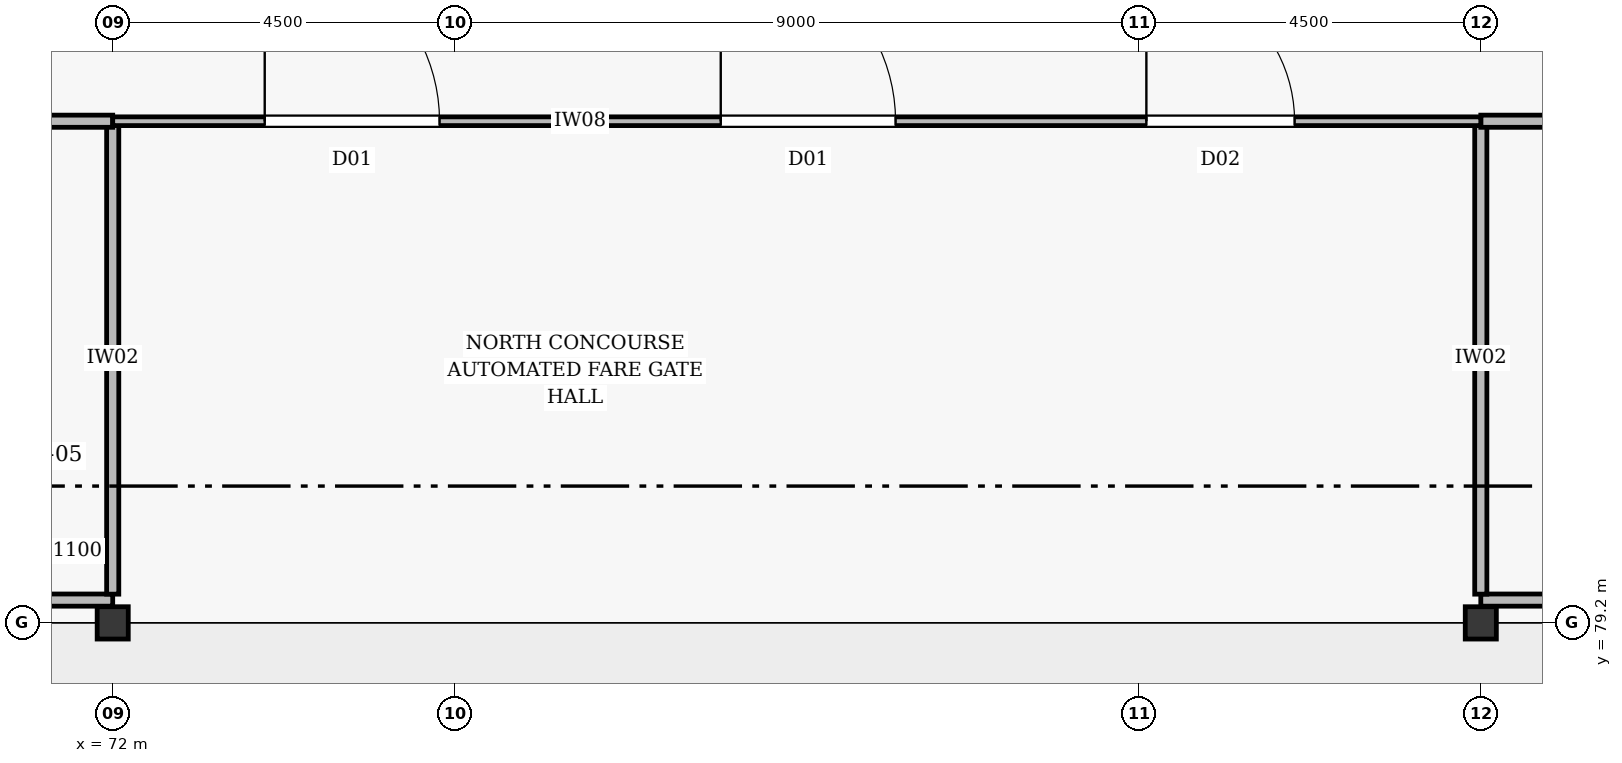
"""IFC4 building model, lengths in metres.
Left out: names, types, materials, properties, quantities, classifications, styles, units other than length and angle.
Written with IfcOpenShell. Run it as: python <this file> out.ifc"""

import sys

from ifc_helpers import new_model, si_unit, direction, frame, frame_2d, origin, origin_2d, place, context, subcontext, project, spatial, rectangle, i_section, extrude, element, fill, save


model = new_model("IFC4")
c1 = context("Model", 3, precision=1e-05, world=origin(), true_north=direction((0.0, 1.0)))
c2 = subcontext(c1, "Body", "Model", "MODEL_VIEW")
j1 = project(units=[si_unit("LENGTHUNIT", "METRE"), si_unit("PLANEANGLEUNIT", "RADIAN")], contexts=[c1])
p1 = place(None, origin())
s1 = spatial("IfcSite", under=j1, at=p1, CompositionType="ELEMENT")
p2 = place(p1, origin())
s2 = spatial("IfcBuilding", under=s1, at=p2, CompositionType="ELEMENT")
p3 = place(p2, origin())
s3 = spatial("IfcBuildingStorey", under=s2, at=p3, CompositionType="ELEMENT", Elevation=0.0)
for number, where, z_axis, x_axis in (
    (1, (72.0, 79.2, 0.0), (0.0, 0.0, 1.0), (1.0, 0.0, 0.0)),
    (2, (90.0, 79.2, 0.0), (0.0, 0.0, 1.0), (1.0, 0.0, 0.0)),
):
    element("IfcColumn", number, at=place(p3, frame(where, z_axis=z_axis, x_axis=x_axis)), inside=s3, PredefinedType="COLUMN", context=c2, shape_type="SweptSolid", body=[
        extrude(i_section(OverallWidth=0.409, OverallDepth=0.425, WebThickness=0.025, FlangeThickness=0.039, at=origin_2d()), origin(), (0.0, 0.0, 1.0), 6.6),
    ])
for number, where, z_axis, x_axis in (
    (3, (54.228, 79.5, 0.0), (0.0, 0.0, 1.0), (1.0, 0.0, 0.0)),
    (4, (90.0, 79.5, 0.0), (0.0, 0.0, 1.0), (1.0, 0.0, 0.0)),
):
    element("IfcWall", number, at=place(p3, frame(where, z_axis=z_axis, x_axis=x_axis)), inside=s3, PredefinedType="PARTITIONING", context=c2, shape_type="SweptSolid", body=[
        extrude(rectangle(XDim=17.772, YDim=0.16, at=frame_2d((8.886, 0.0))), origin(), (0.0, 0.0, 1.0), 4.68),
    ])
for number, where, z_axis, x_axis in (
    (5, (72.0, 79.578, 0.0), (0.0, 0.0, 1.0), (0.0, 1.0, 0.0)),
    (6, (90.0, 79.578, 0.0), (0.0, 0.0, 1.0), (0.0, 1.0, 0.0)),
):
    element("IfcWall", number, at=place(p3, frame(where, z_axis=z_axis, x_axis=x_axis)), inside=s3, PredefinedType="PARTITIONING", context=c2, shape_type="SweptSolid", body=[
        extrude(rectangle(XDim=6.222, YDim=0.16, at=frame_2d((3.111, 0.0))), origin(), (0.0, 0.0, 1.0), 4.68),
    ])
p4 = place(p3, frame((54.15, 85.8, 0.0), z_axis=(0.0, 0.0, 1.0), x_axis=(1.0, 0.0, 0.0)))
e7 = element("IfcWall", 7, at=p4, inside=s3, PredefinedType="PARTITIONING", context=c2, shape_type="SweptSolid", body=[
    extrude(rectangle(XDim=17.85, YDim=0.16, at=frame_2d((8.925, 0.0))), origin(), (0.0, 0.0, 1.0), 5.84),
])
p5 = place(p4, frame((3.4, 0.0, 0.005)))
e8 = element("IfcOpeningElement", 8, at=p5, cuts=e7, PredefinedType="OPENING", context=c2, shape_type="SweptSolid", body=[
    extrude(rectangle(XDim=1.45, YDim=2.15, at=frame_2d((0.725, 1.075))), frame((0.0, 0.092, 0.0), z_axis=(0.0, -1.0, 0.0), x_axis=(1.0, 0.0, 0.0)), (0.0, 0.0, 1.0), 0.184),
])
p6 = place(p4, frame((10.15, 0.0, 0.005)))
e9 = element("IfcOpeningElement", 9, at=p6, cuts=e7, PredefinedType="OPENING", context=c2, shape_type="SweptSolid", body=[
    extrude(rectangle(XDim=1.1, YDim=2.1, at=frame_2d((0.55, 1.05))), frame((0.0, 0.092, 0.0), z_axis=(0.0, -1.0, 0.0), x_axis=(1.0, 0.0, 0.0)), (0.0, 0.0, 1.0), 0.184),
])
p7 = place(p3, frame((90.0, 85.8, 0.0), z_axis=(0.0, 0.0, 1.0), x_axis=(1.0, 0.0, 0.0)))
e10 = element("IfcWall", 10, at=p7, inside=s3, PredefinedType="PARTITIONING", context=c2, shape_type="SweptSolid", body=[
    extrude(rectangle(XDim=17.85, YDim=0.16, at=frame_2d((8.925, 0.0))), origin(), (0.0, 0.0, 1.0), 5.84),
])
p8 = place(p7, frame((4.3, 0.0, 0.005)))
e11 = element("IfcOpeningElement", 11, at=p8, cuts=e10, PredefinedType="OPENING", context=c2, shape_type="SweptSolid", body=[
    extrude(rectangle(XDim=1.1, YDim=2.1, at=frame_2d((0.55, 1.05))), frame((0.0, 0.092, 0.0), z_axis=(0.0, -1.0, 0.0), x_axis=(1.0, 0.0, 0.0)), (0.0, 0.0, 1.0), 0.184),
])
p9 = place(p7, frame((12.6, 0.0, 0.005)))
e12 = element("IfcOpeningElement", 12, at=p9, cuts=e10, PredefinedType="OPENING", context=c2, shape_type="SweptSolid", body=[
    extrude(rectangle(XDim=1.45, YDim=2.15, at=frame_2d((0.725, 1.075))), frame((0.0, 0.092, 0.0), z_axis=(0.0, -1.0, 0.0), x_axis=(1.0, 0.0, 0.0)), (0.0, 0.0, 1.0), 0.184),
])
p10 = place(p3, frame((72.0, 85.8, 0.0), z_axis=(0.0, 0.0, 1.0), x_axis=(1.0, 0.0, 0.0)))
e13 = element("IfcWall", 13, at=p10, inside=s3, PredefinedType="PARTITIONING", context=c2, shape_type="SweptSolid", body=[
    extrude(rectangle(XDim=18.0, YDim=0.115, at=frame_2d((9.0, 0.0))), origin(), (0.0, 0.0, 1.0), 5.84),
])
p11 = place(p10, frame((2.0, 0.0, 0.005)))
e14 = element("IfcOpeningElement", 14, at=p11, cuts=e13, PredefinedType="OPENING", context=c2, shape_type="SweptSolid", body=[
    extrude(rectangle(XDim=2.3, YDim=2.4, at=frame_2d((1.15, 1.2))), frame((0.0, 0.069, 0.0), z_axis=(0.0, -1.0, 0.0), x_axis=(1.0, 0.0, 0.0)), (0.0, 0.0, 1.0), 0.139),
])
p12 = place(p10, frame((8.0, 0.0, 0.005)))
e15 = element("IfcOpeningElement", 15, at=p12, cuts=e13, PredefinedType="OPENING", context=c2, shape_type="SweptSolid", body=[
    extrude(rectangle(XDim=2.3, YDim=2.4, at=frame_2d((1.15, 1.2))), frame((0.0, 0.069, 0.0), z_axis=(0.0, -1.0, 0.0), x_axis=(1.0, 0.0, 0.0)), (0.0, 0.0, 1.0), 0.139),
])
p13 = place(p10, frame((13.6, 0.0, 0.005)))
e16 = element("IfcOpeningElement", 16, at=p13, cuts=e13, PredefinedType="OPENING", context=c2, shape_type="SweptSolid", body=[
    extrude(rectangle(XDim=1.95, YDim=2.3, at=frame_2d((0.975, 1.15))), frame((0.0, 0.069, 0.0), z_axis=(0.0, -1.0, 0.0), x_axis=(1.0, 0.0, 0.0)), (0.0, 0.0, 1.0), 0.139),
])
p14 = place(p11, origin())
e17 = element("IfcDoor", 17, at=p14, inside=s3, OperationType="DOUBLE_DOOR_SINGLE_SWING", PredefinedType="DOOR", context=c2, shape_type="SweptSolid", body=[
    extrude(rectangle(XDim=2.3, YDim=2.4, at=frame_2d((1.15, 1.2))), frame((0.0, 0.025, 0.0), z_axis=(0.0, -1.0, 0.0), x_axis=(1.0, 0.0, 0.0)), (0.0, 0.0, 1.0), 0.05),
])
fill(e14, e17)
p15 = place(p12, origin())
e18 = element("IfcDoor", 18, at=p15, inside=s3, OperationType="DOUBLE_DOOR_SINGLE_SWING", PredefinedType="DOOR", context=c2, shape_type="SweptSolid", body=[
    extrude(rectangle(XDim=2.3, YDim=2.4, at=frame_2d((1.15, 1.2))), frame((0.0, 0.025, 0.0), z_axis=(0.0, -1.0, 0.0), x_axis=(1.0, 0.0, 0.0)), (0.0, 0.0, 1.0), 0.05),
])
fill(e15, e18)
p16 = place(p13, origin())
e19 = element("IfcDoor", 19, at=p16, inside=s3, OperationType="DOUBLE_DOOR_SINGLE_SWING", PredefinedType="DOOR", context=c2, shape_type="SweptSolid", body=[
    extrude(rectangle(XDim=1.95, YDim=2.3, at=frame_2d((0.975, 1.15))), frame((0.0, 0.025, 0.0), z_axis=(0.0, -1.0, 0.0), x_axis=(1.0, 0.0, 0.0)), (0.0, 0.0, 1.0), 0.05),
])
fill(e16, e19)
save(model, sys.argv[1])
